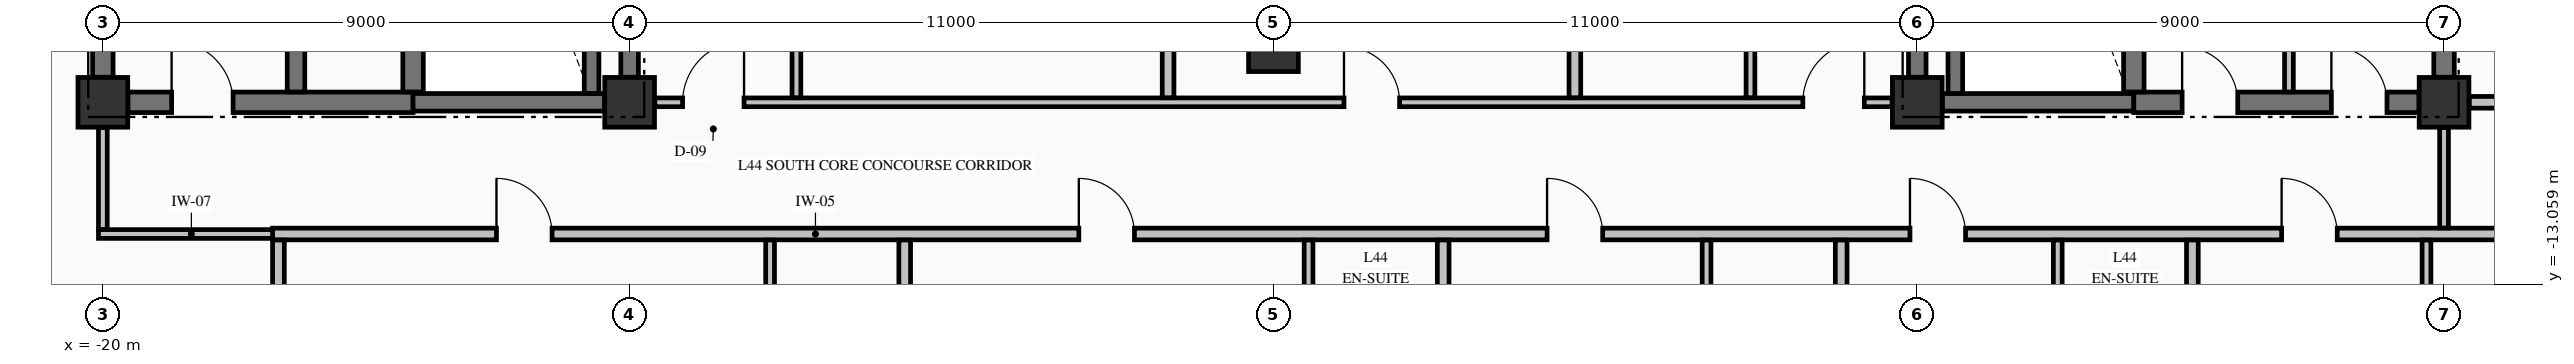
"""IFC4 building model, lengths in metres.
Left out: names, types, materials, properties, quantities, classifications, styles, units other than length and angle.
Written with IfcOpenShell. Run it as: python <this file> out.ifc"""

import sys

from ifc_helpers import new_model, si_unit, direction, frame, frame_2d, origin, origin_2d, place, context, subcontext, project, spatial, rectangle, extrude, element, fill, save


model = new_model("IFC4")
c1 = context("Model", 3, precision=1e-05, world=origin(), true_north=direction((0.0, 1.0)))
c2 = subcontext(c1, "Body", "Model", "MODEL_VIEW")
j1 = project(units=[si_unit("LENGTHUNIT", "METRE"), si_unit("PLANEANGLEUNIT", "RADIAN")], contexts=[c1])
p1 = place(None, origin())
s1 = spatial("IfcSite", under=j1, at=p1, CompositionType="ELEMENT")
p2 = place(p1, origin())
s2 = spatial("IfcBuilding", under=s1, at=p2, CompositionType="ELEMENT")
p3 = place(p2, frame((0.0, 0.0, 172.86)))
s3 = spatial("IfcBuildingStorey", under=s2, at=p3, CompositionType="ELEMENT", Elevation=172.86)
for number, where, z_axis, x_axis in (
    (1, (-20.0, -9.95, -0.25), (0.0, 0.0, 1.0), (1.0, 0.0, 0.0)),
    (2, (-11.0, -9.95, -0.25), (0.0, 0.0, 1.0), (1.0, 0.0, 0.0)),
    (3, (11.0, -9.95, -0.25), (0.0, 0.0, 1.0), (1.0, 0.0, 0.0)),
    (4, (20.0, -9.95, -0.25), (0.0, 0.0, 1.0), (1.0, 0.0, 0.0)),
    (5, (0.0, -9.0, -0.25), (0.0, 0.0, 1.0), (1.0, 0.0, 0.0)),
):
    element("IfcColumn", number, at=place(p3, frame(where, z_axis=z_axis, x_axis=x_axis)), inside=s3, PredefinedType="COLUMN", context=c2, shape_type="SweptSolid", body=[
        extrude(rectangle(XDim=0.85, YDim=0.85, at=origin_2d()), origin(), (0.0, 0.0, 1.0), 3.375),
    ])
p4 = place(p3, frame((-19.571, -9.95, 0.0), z_axis=(0.0, 0.0, 1.0), x_axis=(1.0, 0.0, 0.0)))
e6 = element("IfcWall", 6, at=p4, inside=s3, PredefinedType="SHEAR", context=c2, shape_type="SweptSolid", body=[
    extrude(rectangle(XDim=4.871, YDim=0.35, at=frame_2d((2.436, 0.0))), origin(), (0.0, 0.0, 1.0), 3.125),
])
p5 = place(p4, frame((0.746, 0.0, 0.0)))
e7 = element("IfcOpeningElement", 7, at=p5, cuts=e6, PredefinedType="OPENING", context=c2, shape_type="SweptSolid", body=[
    extrude(rectangle(XDim=1.05, YDim=2.15, at=frame_2d((0.525, 1.075))), frame((0.0, 0.185, 0.0), z_axis=(0.0, -1.0, 0.0), x_axis=(1.0, 0.0, 0.0)), (0.0, 0.0, 1.0), 0.37),
])
for number, where, z_axis, x_axis in (
    (8, (-14.7, -9.95, 0.0), (0.0, 0.0, 1.0), (1.0, 0.0, 0.0)),
    (9, (11.429, -9.95, 0.0), (0.0, 0.0, 1.0), (1.0, 0.0, 0.0)),
):
    element("IfcWall", number, at=place(p3, frame(where, z_axis=z_axis, x_axis=x_axis)), inside=s3, PredefinedType="SHEAR", context=c2, shape_type="SweptSolid", body=[
        extrude(rectangle(XDim=3.271, YDim=0.3, at=frame_2d((1.635, 0.0))), origin(), (0.0, 0.0, 1.0), 3.125),
    ])
p6 = place(p3, frame((14.7, -9.95, 0.0), z_axis=(0.0, 0.0, 1.0), x_axis=(1.0, 0.0, 0.0)))
e10 = element("IfcWall", 10, at=p6, inside=s3, PredefinedType="SHEAR", context=c2, shape_type="SweptSolid", body=[
    extrude(rectangle(XDim=4.871, YDim=0.35, at=frame_2d((2.436, 0.0))), origin(), (0.0, 0.0, 1.0), 3.125),
])
p7 = place(p6, frame((0.825, 0.0, 0.0)))
e11 = element("IfcOpeningElement", 11, at=p7, cuts=e10, PredefinedType="OPENING", context=c2, shape_type="SweptSolid", body=[
    extrude(rectangle(XDim=0.95, YDim=2.15, at=frame_2d((0.475, 1.075))), frame((0.0, 0.185, 0.0), z_axis=(0.0, -1.0, 0.0), x_axis=(1.0, 0.0, 0.0)), (0.0, 0.0, 1.0), 0.37),
])
p8 = place(p6, frame((3.375, 0.0, 0.0)))
e12 = element("IfcOpeningElement", 12, at=p8, cuts=e10, PredefinedType="OPENING", context=c2, shape_type="SweptSolid", body=[
    extrude(rectangle(XDim=0.95, YDim=2.15, at=frame_2d((0.475, 1.075))), frame((0.0, 0.185, 0.0), z_axis=(0.0, -1.0, 0.0), x_axis=(1.0, 0.0, 0.0)), (0.0, 0.0, 1.0), 0.37),
])
p9 = place(p3, frame((-20.075, -12.2, 0.0), z_axis=(0.0, 0.0, 1.0), x_axis=(1.0, 0.0, 0.0)))
e13 = element("IfcWall", 13, at=p9, inside=s3, PredefinedType="PARTITIONING", context=c2, shape_type="SweptSolid", body=[
    extrude(rectangle(XDim=3.175, YDim=0.15, at=frame_2d((1.587, 0.0))), origin(), (0.0, 0.0, 1.0), 3.125),
])
p10 = place(p3, frame((-17.1, -12.2, 0.0), z_axis=(0.0, 0.0, 1.0), x_axis=(1.0, 0.0, 0.0)))
e14 = element("IfcWall", 14, at=p10, inside=s3, PredefinedType="PARTITIONING", context=c2, shape_type="SweptSolid", body=[
    extrude(rectangle(XDim=39.2, YDim=0.2, at=frame_2d((19.6, 0.0))), origin(), (0.0, 0.0, 1.0), 3.125),
])
p11 = place(p10, frame((3.825, 0.0, 0.0)))
e15 = element("IfcOpeningElement", 15, at=p11, cuts=e14, PredefinedType="OPENING", context=c2, shape_type="SweptSolid", body=[
    extrude(rectangle(XDim=0.95, YDim=2.15, at=frame_2d((0.475, 1.075))), frame((0.0, 0.11, 0.0), z_axis=(0.0, -1.0, 0.0), x_axis=(1.0, 0.0, 0.0)), (0.0, 0.0, 1.0), 0.22),
])
p12 = place(p10, frame((13.775, 0.0, 0.0)))
e16 = element("IfcOpeningElement", 16, at=p12, cuts=e14, PredefinedType="OPENING", context=c2, shape_type="SweptSolid", body=[
    extrude(rectangle(XDim=0.95, YDim=2.15, at=frame_2d((0.475, 1.075))), frame((0.0, 0.11, 0.0), z_axis=(0.0, -1.0, 0.0), x_axis=(1.0, 0.0, 0.0)), (0.0, 0.0, 1.0), 0.22),
])
p13 = place(p10, frame((21.775, 0.0, 0.0)))
e17 = element("IfcOpeningElement", 17, at=p13, cuts=e14, PredefinedType="OPENING", context=c2, shape_type="SweptSolid", body=[
    extrude(rectangle(XDim=0.95, YDim=2.15, at=frame_2d((0.475, 1.075))), frame((0.0, 0.11, 0.0), z_axis=(0.0, -1.0, 0.0), x_axis=(1.0, 0.0, 0.0)), (0.0, 0.0, 1.0), 0.22),
])
p14 = place(p10, frame((27.975, 0.0, 0.0)))
e18 = element("IfcOpeningElement", 18, at=p14, cuts=e14, PredefinedType="OPENING", context=c2, shape_type="SweptSolid", body=[
    extrude(rectangle(XDim=0.95, YDim=2.15, at=frame_2d((0.475, 1.075))), frame((0.0, 0.11, 0.0), z_axis=(0.0, -1.0, 0.0), x_axis=(1.0, 0.0, 0.0)), (0.0, 0.0, 1.0), 0.22),
])
p15 = place(p10, frame((34.325, 0.0, 0.0)))
e19 = element("IfcOpeningElement", 19, at=p15, cuts=e14, PredefinedType="OPENING", context=c2, shape_type="SweptSolid", body=[
    extrude(rectangle(XDim=0.95, YDim=2.15, at=frame_2d((0.475, 1.075))), frame((0.0, 0.11, 0.0), z_axis=(0.0, -1.0, 0.0), x_axis=(1.0, 0.0, 0.0)), (0.0, 0.0, 1.0), 0.22),
])
p16 = place(p3, frame((-10.569, -9.95, 0.0), z_axis=(0.0, 0.0, 1.0), x_axis=(1.0, 0.0, 0.0)))
e20 = element("IfcWall", 20, at=p16, inside=s3, PredefinedType="PARTITIONING", context=c2, shape_type="SweptSolid", body=[
    extrude(rectangle(XDim=21.138, YDim=0.15, at=frame_2d((10.569, 0.0))), origin(), (0.0, 0.0, 1.0), 3.125),
])
p17 = place(p16, frame((0.474, 0.0, 0.0)))
e21 = element("IfcOpeningElement", 21, at=p17, cuts=e20, PredefinedType="OPENING", context=c2, shape_type="SweptSolid", body=[
    extrude(rectangle(XDim=1.05, YDim=2.15, at=frame_2d((0.525, 1.075))), frame((0.0, 0.085, 0.0), z_axis=(0.0, -1.0, 0.0), x_axis=(1.0, 0.0, 0.0)), (0.0, 0.0, 1.0), 0.17),
])
p18 = place(p16, frame((19.614, 0.0, 0.0)))
e22 = element("IfcOpeningElement", 22, at=p18, cuts=e20, PredefinedType="OPENING", context=c2, shape_type="SweptSolid", body=[
    extrude(rectangle(XDim=1.05, YDim=2.15, at=frame_2d((0.525, 1.075))), frame((0.0, 0.085, 0.0), z_axis=(0.0, -1.0, 0.0), x_axis=(1.0, 0.0, 0.0)), (0.0, 0.0, 1.0), 0.17),
])
p19 = place(p16, frame((11.774, 0.0, 0.0)))
e23 = element("IfcOpeningElement", 23, at=p19, cuts=e20, PredefinedType="OPENING", context=c2, shape_type="SweptSolid", body=[
    extrude(rectangle(XDim=0.95, YDim=2.15, at=frame_2d((0.475, 1.075))), frame((0.0, 0.085, 0.0), z_axis=(0.0, -1.0, 0.0), x_axis=(1.0, 0.0, 0.0)), (0.0, 0.0, 1.0), 0.17),
])
p20 = place(p3, frame((20.431, -9.95, 0.0), z_axis=(0.0, 0.0, 1.0), x_axis=(1.0, 0.0, 0.0)))
e24 = element("IfcWall", 24, at=p20, inside=s3, PredefinedType="PARTITIONING", context=c2, shape_type="SweptSolid", body=[
    extrude(rectangle(XDim=6.404, YDim=0.2, at=frame_2d((3.202, 0.0))), origin(), (0.0, 0.0, 1.0), 3.125),
])
p21 = place(p3, frame((-20.0, -9.521, 0.0), z_axis=(0.0, 0.0, 1.0), x_axis=(0.0, 1.0, 0.0)))
e25 = element("IfcWall", 25, at=p21, inside=s3, PredefinedType="SHEAR", context=c2, shape_type="SweptSolid", body=[
    extrude(rectangle(XDim=9.092, YDim=0.35, at=frame_2d((4.546, 0.0))), origin(), (0.0, 0.0, 1.0), 3.125),
])
p22 = place(p3, frame((-16.7, -9.773, 0.0), z_axis=(0.0, 0.0, 1.0), x_axis=(0.0, 1.0, 0.0)))
e26 = element("IfcWall", 26, at=p22, inside=s3, PredefinedType="SHEAR", context=c2, shape_type="SweptSolid", body=[
    extrude(rectangle(XDim=9.371, YDim=0.3, at=frame_2d((4.686, 0.0))), origin(), (0.0, 0.0, 1.0), 3.125),
])
p23 = place(p3, frame((-14.7, -9.773, 0.0), z_axis=(0.0, 0.0, 1.0), x_axis=(0.0, 1.0, 0.0)))
e27 = element("IfcWall", 27, at=p23, inside=s3, PredefinedType="SHEAR", context=c2, shape_type="SweptSolid", body=[
    extrude(rectangle(XDim=9.371, YDim=0.35, at=frame_2d((4.686, 0.0))), origin(), (0.0, 0.0, 1.0), 3.125),
])
p24 = place(p3, frame((-11.65, -9.798, 0.0), z_axis=(0.0, 0.0, 1.0), x_axis=(0.0, 1.0, 0.0)))
e28 = element("IfcWall", 28, at=p24, inside=s3, PredefinedType="SOLIDWALL", context=c2, shape_type="SweptSolid", body=[
    extrude(rectangle(XDim=9.396, YDim=0.25, at=frame_2d((4.698, 0.0))), origin(), (0.0, 0.0, 1.0), 3.125),
])
for number, where, z_axis, x_axis in (
    (29, (-11.0, -9.521, 0.0), (0.0, 0.0, 1.0), (0.0, 1.0, 0.0)),
    (30, (11.0, -9.521, 0.0), (0.0, 0.0, 1.0), (0.0, 1.0, 0.0)),
):
    element("IfcWall", number, at=place(p3, frame(where, z_axis=z_axis, x_axis=x_axis)), inside=s3, PredefinedType="SHEAR", context=c2, shape_type="SweptSolid", body=[
        extrude(rectangle(XDim=9.092, YDim=0.3, at=frame_2d((4.546, 0.0))), origin(), (0.0, 0.0, 1.0), 3.125),
    ])
p25 = place(p3, frame((11.65, -9.798, 0.0), z_axis=(0.0, 0.0, 1.0), x_axis=(0.0, 1.0, 0.0)))
e31 = element("IfcWall", 31, at=p25, inside=s3, PredefinedType="SOLIDWALL", context=c2, shape_type="SweptSolid", body=[
    extrude(rectangle(XDim=9.396, YDim=0.25, at=frame_2d((4.698, 0.0))), origin(), (0.0, 0.0, 1.0), 3.125),
])
p26 = place(p3, frame((14.7, -9.773, 0.0), z_axis=(0.0, 0.0, 1.0), x_axis=(0.0, 1.0, 0.0)))
e32 = element("IfcWall", 32, at=p26, inside=s3, PredefinedType="SHEAR", context=c2, shape_type="SweptSolid", body=[
    extrude(rectangle(XDim=9.371, YDim=0.35, at=frame_2d((4.686, 0.0))), origin(), (0.0, 0.0, 1.0), 3.125),
])
p27 = place(p3, frame((20.0, -9.521, 0.0), z_axis=(0.0, 0.0, 1.0), x_axis=(0.0, 1.0, 0.0)))
e33 = element("IfcWall", 33, at=p27, inside=s3, PredefinedType="SHEAR", context=c2, shape_type="SweptSolid", body=[
    extrude(rectangle(XDim=9.092, YDim=0.35, at=frame_2d((4.546, 0.0))), origin(), (0.0, 0.0, 1.0), 3.125),
])
p28 = place(p3, frame((-20.0, -12.122, 0.0), z_axis=(0.0, 0.0, 1.0), x_axis=(0.0, 1.0, 0.0)))
e34 = element("IfcWall", 34, at=p28, inside=s3, PredefinedType="PARTITIONING", context=c2, shape_type="SweptSolid", body=[
    extrude(rectangle(XDim=1.741, YDim=0.15, at=frame_2d((0.871, 0.0))), origin(), (0.0, 0.0, 1.0), 2.317),
])
p29 = place(p3, frame((-17.0, -18.994, 0.0), z_axis=(0.0, 0.0, 1.0), x_axis=(0.0, 1.0, 0.0)))
e35 = element("IfcWall", 35, at=p29, inside=s3, PredefinedType="PARTITIONING", context=c2, shape_type="SweptSolid", body=[
    extrude(rectangle(XDim=6.691, YDim=0.2, at=frame_2d((3.345, 0.0))), origin(), (0.0, 0.0, 1.0), 3.125),
])
p30 = place(p3, frame((-8.6, -14.372, 0.0), z_axis=(0.0, 0.0, 1.0), x_axis=(0.0, 1.0, 0.0)))
e36 = element("IfcWall", 36, at=p30, inside=s3, PredefinedType="PARTITIONING", context=c2, shape_type="SweptSolid", body=[
    extrude(rectangle(XDim=2.069, YDim=0.15, at=frame_2d((1.035, 0.0))), origin(), (0.0, 0.0, 1.0), 3.125),
])
p31 = place(p3, frame((-8.15, -9.872, 0.0), z_axis=(0.0, 0.0, 1.0), x_axis=(0.0, 1.0, 0.0)))
e37 = element("IfcWall", 37, at=p31, inside=s3, PredefinedType="PARTITIONING", context=c2, shape_type="SweptSolid", body=[
    extrude(rectangle(XDim=10.569, YDim=0.15, at=frame_2d((5.285, 0.0))), origin(), (0.0, 0.0, 1.0), 3.125),
])
p32 = place(p31, frame((4.802, 0.0, 0.0)))
e38 = element("IfcOpeningElement", 38, at=p32, cuts=e37, PredefinedType="OPENING", context=c2, shape_type="SweptSolid", body=[
    extrude(rectangle(XDim=1.0, YDim=2.15, at=frame_2d((0.5, 1.075))), frame((0.0, 0.085, 0.0), z_axis=(0.0, -1.0, 0.0), x_axis=(1.0, 0.0, 0.0)), (0.0, 0.0, 1.0), 0.17),
])
p33 = place(p3, frame((-6.3, -14.372, 0.0), z_axis=(0.0, 0.0, 1.0), x_axis=(0.0, 1.0, 0.0)))
e39 = element("IfcWall", 39, at=p33, inside=s3, PredefinedType="PARTITIONING", context=c2, shape_type="SweptSolid", body=[
    extrude(rectangle(XDim=2.069, YDim=0.2, at=frame_2d((1.035, 0.0))), origin(), (0.0, 0.0, 1.0), 3.125),
])
p34 = place(p3, frame((-1.8, -9.872, 0.0), z_axis=(0.0, 0.0, 1.0), x_axis=(0.0, 1.0, 0.0)))
e40 = element("IfcWall", 40, at=p34, inside=s3, PredefinedType="PARTITIONING", context=c2, shape_type="SweptSolid", body=[
    extrude(rectangle(XDim=4.569, YDim=0.2, at=frame_2d((2.285, 0.0))), origin(), (0.0, 0.0, 1.0), 3.125),
])
p35 = place(p3, frame((0.6, -15.072, 0.0), z_axis=(0.0, 0.0, 1.0), x_axis=(0.0, 1.0, 0.0)))
e41 = element("IfcWall", 41, at=p35, inside=s3, PredefinedType="PARTITIONING", context=c2, shape_type="SweptSolid", body=[
    extrude(rectangle(XDim=2.769, YDim=0.15, at=frame_2d((1.385, 0.0))), origin(), (0.0, 0.0, 1.0), 3.125),
])
p36 = place(p3, frame((2.9, -15.072, 0.0), z_axis=(0.0, 0.0, 1.0), x_axis=(0.0, 1.0, 0.0)))
e42 = element("IfcWall", 42, at=p36, inside=s3, PredefinedType="PARTITIONING", context=c2, shape_type="SweptSolid", body=[
    extrude(rectangle(XDim=2.769, YDim=0.2, at=frame_2d((1.385, 0.0))), origin(), (0.0, 0.0, 1.0), 3.125),
])
p37 = place(p3, frame((5.15, -9.872, 0.0), z_axis=(0.0, 0.0, 1.0), x_axis=(0.0, 1.0, 0.0)))
e43 = element("IfcWall", 43, at=p37, inside=s3, PredefinedType="PARTITIONING", context=c2, shape_type="SweptSolid", body=[
    extrude(rectangle(XDim=4.569, YDim=0.2, at=frame_2d((2.285, 0.0))), origin(), (0.0, 0.0, 1.0), 3.125),
])
p38 = place(p3, frame((7.4, -14.372, 0.0), z_axis=(0.0, 0.0, 1.0), x_axis=(0.0, 1.0, 0.0)))
e44 = element("IfcWall", 44, at=p38, inside=s3, PredefinedType="PARTITIONING", context=c2, shape_type="SweptSolid", body=[
    extrude(rectangle(XDim=2.069, YDim=0.15, at=frame_2d((1.035, 0.0))), origin(), (0.0, 0.0, 1.0), 3.125),
])
p39 = place(p3, frame((8.15, -9.872, 0.0), z_axis=(0.0, 0.0, 1.0), x_axis=(0.0, 1.0, 0.0)))
e45 = element("IfcWall", 45, at=p39, inside=s3, PredefinedType="PARTITIONING", context=c2, shape_type="SweptSolid", body=[
    extrude(rectangle(XDim=4.569, YDim=0.15, at=frame_2d((2.285, 0.0))), origin(), (0.0, 0.0, 1.0), 3.125),
])
p40 = place(p39, frame((1.847, 0.0, 0.0)))
e46 = element("IfcOpeningElement", 46, at=p40, cuts=e45, PredefinedType="OPENING", context=c2, shape_type="SweptSolid", body=[
    extrude(rectangle(XDim=0.95, YDim=2.15, at=frame_2d((0.475, 1.075))), frame((0.0, 0.085, 0.0), z_axis=(0.0, -1.0, 0.0), x_axis=(1.0, 0.0, 0.0)), (0.0, 0.0, 1.0), 0.17),
])
p41 = place(p3, frame((9.7, -14.372, 0.0), z_axis=(0.0, 0.0, 1.0), x_axis=(0.0, 1.0, 0.0)))
e47 = element("IfcWall", 47, at=p41, inside=s3, PredefinedType="PARTITIONING", context=c2, shape_type="SweptSolid", body=[
    extrude(rectangle(XDim=2.069, YDim=0.2, at=frame_2d((1.035, 0.0))), origin(), (0.0, 0.0, 1.0), 3.125),
])
p42 = place(p3, frame((13.4, -15.072, 0.0), z_axis=(0.0, 0.0, 1.0), x_axis=(0.0, 1.0, 0.0)))
e48 = element("IfcWall", 48, at=p42, inside=s3, PredefinedType="PARTITIONING", context=c2, shape_type="SweptSolid", body=[
    extrude(rectangle(XDim=2.769, YDim=0.15, at=frame_2d((1.385, 0.0))), origin(), (0.0, 0.0, 1.0), 3.125),
])
p43 = place(p3, frame((15.7, -15.072, 0.0), z_axis=(0.0, 0.0, 1.0), x_axis=(0.0, 1.0, 0.0)))
e49 = element("IfcWall", 49, at=p43, inside=s3, PredefinedType="PARTITIONING", context=c2, shape_type="SweptSolid", body=[
    extrude(rectangle(XDim=2.769, YDim=0.2, at=frame_2d((1.385, 0.0))), origin(), (0.0, 0.0, 1.0), 3.125),
])
p44 = place(p3, frame((17.35, -9.772, 0.0), z_axis=(0.0, 0.0, 1.0), x_axis=(0.0, 1.0, 0.0)))
e50 = element("IfcWall", 50, at=p44, inside=s3, PredefinedType="PARTITIONING", context=c2, shape_type="SweptSolid", body=[
    extrude(rectangle(XDim=7.194, YDim=0.15, at=frame_2d((3.597, 0.0))), origin(), (0.0, 0.0, 1.0), 3.125),
])
p45 = place(p3, frame((19.7, -14.372, 0.0), z_axis=(0.0, 0.0, 1.0), x_axis=(0.0, 1.0, 0.0)))
e51 = element("IfcWall", 51, at=p45, inside=s3, PredefinedType="PARTITIONING", context=c2, shape_type="SweptSolid", body=[
    extrude(rectangle(XDim=2.069, YDim=0.15, at=frame_2d((1.035, 0.0))), origin(), (0.0, 0.0, 1.0), 2.317),
])
p46 = place(p3, frame((20.0, -12.097, 0.0), z_axis=(0.0, 0.0, 1.0), x_axis=(0.0, 1.0, 0.0)))
e52 = element("IfcWall", 52, at=p46, inside=s3, PredefinedType="PARTITIONING", context=c2, shape_type="SweptSolid", body=[
    extrude(rectangle(XDim=1.716, YDim=0.15, at=frame_2d((0.858, 0.0))), origin(), (0.0, 0.0, 1.0), 2.317),
])
p47 = place(p5, origin())
e53 = element("IfcDoor", 53, at=p47, inside=s3, OperationType="SINGLE_SWING_LEFT", PredefinedType="DOOR", context=c2, shape_type="SweptSolid", body=[
    extrude(rectangle(XDim=1.05, YDim=2.15, at=frame_2d((0.525, 1.075))), frame((0.0, 0.025, 0.0), z_axis=(0.0, -1.0, 0.0), x_axis=(1.0, 0.0, 0.0)), (0.0, 0.0, 1.0), 0.05),
])
fill(e7, e53)
p48 = place(p7, origin())
e54 = element("IfcDoor", 54, at=p48, inside=s3, OperationType="SINGLE_SWING_LEFT", PredefinedType="DOOR", context=c2, shape_type="SweptSolid", body=[
    extrude(rectangle(XDim=0.95, YDim=2.15, at=frame_2d((0.475, 1.075))), frame((0.0, 0.025, 0.0), z_axis=(0.0, -1.0, 0.0), x_axis=(1.0, 0.0, 0.0)), (0.0, 0.0, 1.0), 0.05),
])
fill(e11, e54)
p49 = place(p8, origin())
e55 = element("IfcDoor", 55, at=p49, inside=s3, OperationType="SINGLE_SWING_LEFT", PredefinedType="DOOR", context=c2, shape_type="SweptSolid", body=[
    extrude(rectangle(XDim=0.95, YDim=2.15, at=frame_2d((0.475, 1.075))), frame((0.0, 0.025, 0.0), z_axis=(0.0, -1.0, 0.0), x_axis=(1.0, 0.0, 0.0)), (0.0, 0.0, 1.0), 0.05),
])
fill(e12, e55)
p50 = place(p17, origin())
e56 = element("IfcDoor", 56, at=p50, inside=s3, OperationType="SINGLE_SWING_RIGHT", PredefinedType="DOOR", context=c2, shape_type="SweptSolid", body=[
    extrude(rectangle(XDim=1.05, YDim=2.15, at=frame_2d((0.525, 1.075))), frame((0.0, 0.025, 0.0), z_axis=(0.0, -1.0, 0.0), x_axis=(1.0, 0.0, 0.0)), (0.0, 0.0, 1.0), 0.05),
])
fill(e21, e56)
p51 = place(p18, origin())
e57 = element("IfcDoor", 57, at=p51, inside=s3, OperationType="SINGLE_SWING_RIGHT", PredefinedType="DOOR", context=c2, shape_type="SweptSolid", body=[
    extrude(rectangle(XDim=1.05, YDim=2.15, at=frame_2d((0.525, 1.075))), frame((0.0, 0.025, 0.0), z_axis=(0.0, -1.0, 0.0), x_axis=(1.0, 0.0, 0.0)), (0.0, 0.0, 1.0), 0.05),
])
fill(e22, e57)
p52 = place(p11, origin())
e58 = element("IfcDoor", 58, at=p52, inside=s3, OperationType="SINGLE_SWING_LEFT", PredefinedType="DOOR", context=c2, shape_type="SweptSolid", body=[
    extrude(rectangle(XDim=0.95, YDim=2.15, at=frame_2d((0.475, 1.075))), frame((0.0, 0.025, 0.0), z_axis=(0.0, -1.0, 0.0), x_axis=(1.0, 0.0, 0.0)), (0.0, 0.0, 1.0), 0.05),
])
fill(e15, e58)
p53 = place(p12, origin())
e59 = element("IfcDoor", 59, at=p53, inside=s3, OperationType="SINGLE_SWING_LEFT", PredefinedType="DOOR", context=c2, shape_type="SweptSolid", body=[
    extrude(rectangle(XDim=0.95, YDim=2.15, at=frame_2d((0.475, 1.075))), frame((0.0, 0.025, 0.0), z_axis=(0.0, -1.0, 0.0), x_axis=(1.0, 0.0, 0.0)), (0.0, 0.0, 1.0), 0.05),
])
fill(e16, e59)
p54 = place(p13, origin())
e60 = element("IfcDoor", 60, at=p54, inside=s3, OperationType="SINGLE_SWING_LEFT", PredefinedType="DOOR", context=c2, shape_type="SweptSolid", body=[
    extrude(rectangle(XDim=0.95, YDim=2.15, at=frame_2d((0.475, 1.075))), frame((0.0, 0.025, 0.0), z_axis=(0.0, -1.0, 0.0), x_axis=(1.0, 0.0, 0.0)), (0.0, 0.0, 1.0), 0.05),
])
fill(e17, e60)
p55 = place(p14, origin())
e61 = element("IfcDoor", 61, at=p55, inside=s3, OperationType="SINGLE_SWING_LEFT", PredefinedType="DOOR", context=c2, shape_type="SweptSolid", body=[
    extrude(rectangle(XDim=0.95, YDim=2.15, at=frame_2d((0.475, 1.075))), frame((0.0, 0.025, 0.0), z_axis=(0.0, -1.0, 0.0), x_axis=(1.0, 0.0, 0.0)), (0.0, 0.0, 1.0), 0.05),
])
fill(e18, e61)
p56 = place(p15, origin())
e62 = element("IfcDoor", 62, at=p56, inside=s3, OperationType="SINGLE_SWING_LEFT", PredefinedType="DOOR", context=c2, shape_type="SweptSolid", body=[
    extrude(rectangle(XDim=0.95, YDim=2.15, at=frame_2d((0.475, 1.075))), frame((0.0, 0.025, 0.0), z_axis=(0.0, -1.0, 0.0), x_axis=(1.0, 0.0, 0.0)), (0.0, 0.0, 1.0), 0.05),
])
fill(e19, e62)
p57 = place(p19, origin())
e63 = element("IfcDoor", 63, at=p57, inside=s3, OperationType="SINGLE_SWING_LEFT", PredefinedType="DOOR", context=c2, shape_type="SweptSolid", body=[
    extrude(rectangle(XDim=0.95, YDim=2.15, at=frame_2d((0.475, 1.075))), frame((0.0, 0.025, 0.0), z_axis=(0.0, -1.0, 0.0), x_axis=(1.0, 0.0, 0.0)), (0.0, 0.0, 1.0), 0.05),
])
fill(e23, e63)
save(model, sys.argv[1])
